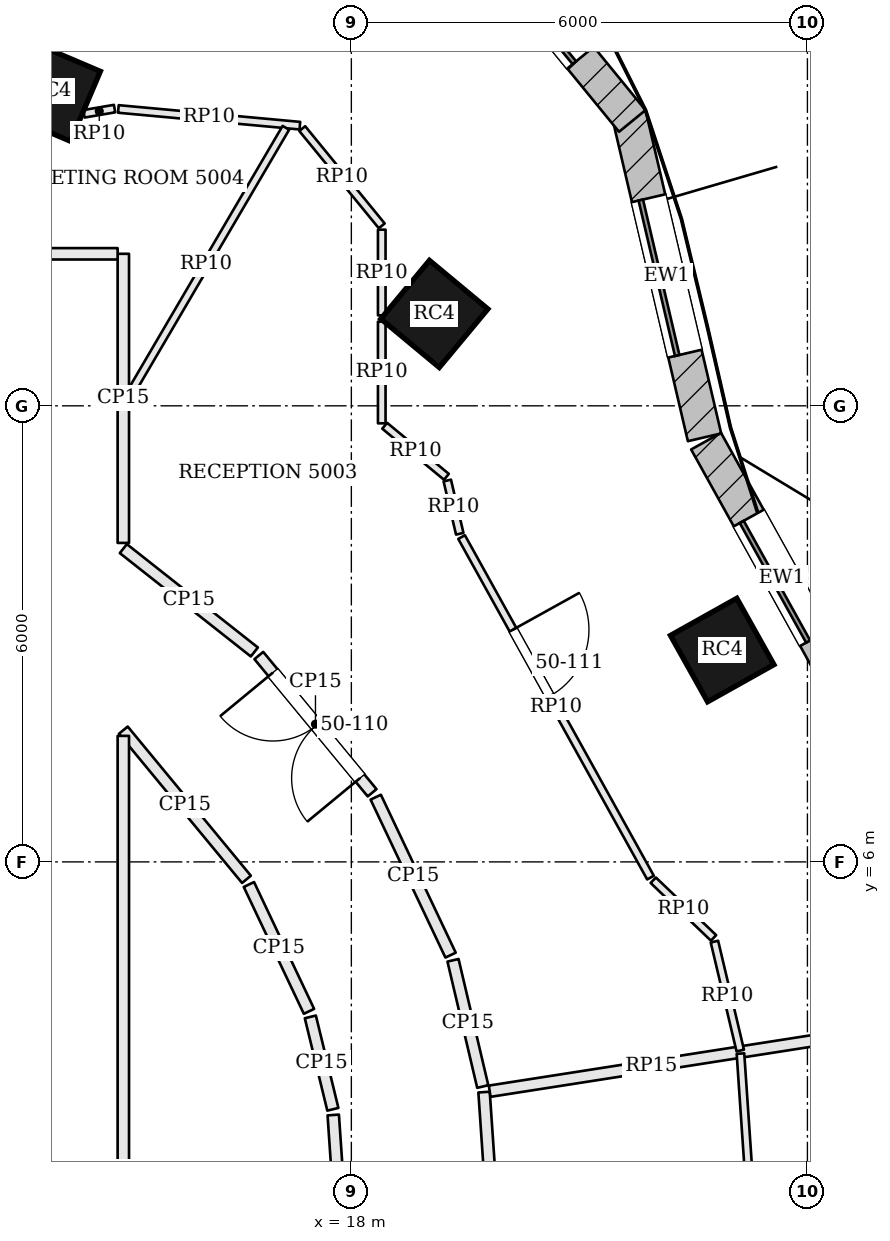
"""IFC4 building model, lengths in metres.
Left out: names, types, materials, properties, quantities, classifications, styles, units other than length and angle.
Written with IfcOpenShell. Run it as: python <this file> out.ifc"""

import sys

from ifc_helpers import new_model, si_unit, direction, frame, frame_2d, origin, origin_2d, place, context, subcontext, project, spatial, rectangle, extrude, element, fill, save


model = new_model("IFC4")
c1 = context("Model", 3, precision=1e-05, world=origin(), true_north=direction((0.0, 1.0)))
c2 = subcontext(c1, "Body", "Model", "MODEL_VIEW")
j1 = project(units=[si_unit("LENGTHUNIT", "METRE"), si_unit("PLANEANGLEUNIT", "RADIAN")], contexts=[c1])
p1 = place(None, origin())
s1 = spatial("IfcSite", under=j1, at=p1, CompositionType="ELEMENT")
p2 = place(p1, origin())
s2 = spatial("IfcBuilding", under=s1, at=p2, CompositionType="ELEMENT")
p3 = place(p2, frame((0.0, 0.0, 205.2)))
s3 = spatial("IfcBuildingStorey", under=s2, at=p3, CompositionType="ELEMENT", Elevation=205.2)
for number, where, z_axis, x_axis in (
    (1, (22.879, 8.787, 0.0), (0.0, 0.0, 1.0), (-0.489, 0.873, 0.0)),
    (2, (19.092, 13.209, 0.0), (0.0, 0.0, 1.0), (-0.769, 0.639, 0.0)),
    (3, (14.042, 16.136, 0.0), (0.0, 0.0, 1.0), (-0.92, 0.392, 0.0)),
):
    element("IfcColumn", number, at=place(p3, frame(where, z_axis=z_axis, x_axis=x_axis)), inside=s3, PredefinedType="COLUMN", context=c2, shape_type="SweptSolid", body=[
        extrude(rectangle(XDim=1.0, YDim=1.0, at=origin_2d()), origin(), (0.0, 0.0, 1.0), 3.9),
    ])
p4 = place(p3, frame((24.662, 7.939, 0.0), z_axis=(0.0, 0.0, 1.0), x_axis=(-0.485153910721, 0.874428775208, 0.0)))
e4 = element("IfcWall", 4, at=p4, inside=s3, PredefinedType="SOLIDWALL", context=c2, shape_type="SweptSolid", body=[
    extrude(rectangle(XDim=4.112, YDim=0.45, at=frame_2d((2.056, 0.0))), origin(), (0.0, 0.0, 1.0), 3.7),
])
p5 = place(p4, frame((1.156, 0.0, 0.9)))
e5 = element("IfcOpeningElement", 5, at=p5, cuts=e4, PredefinedType="OPENING", context=c2, shape_type="SweptSolid", body=[
    extrude(rectangle(XDim=1.8, YDim=2.3, at=frame_2d((0.9, 1.15))), frame((0.0, 0.235, 0.0), z_axis=(0.0, -1.0, 0.0), x_axis=(1.0, 0.0, 0.0)), (0.0, 0.0, 1.0), 0.47),
])
p6 = place(p3, frame((22.646, 11.586, 0.0), z_axis=(0.0, 0.0, 1.0), x_axis=(-0.227925124198, 0.973678662475, 0.0)))
e6 = element("IfcWall", 6, at=p6, inside=s3, PredefinedType="SOLIDWALL", context=c2, shape_type="SweptSolid", body=[
    extrude(rectangle(XDim=4.361, YDim=0.45, at=frame_2d((2.18, 0.0))), origin(), (0.0, 0.0, 1.0), 3.7),
])
p7 = place(p6, frame((1.13, 0.0, 0.9)))
e7 = element("IfcOpeningElement", 7, at=p7, cuts=e6, PredefinedType="OPENING", context=c2, shape_type="SweptSolid", body=[
    extrude(rectangle(XDim=2.1, YDim=2.3, at=frame_2d((1.05, 1.15))), frame((0.0, 0.235, 0.0), z_axis=(0.0, -1.0, 0.0), x_axis=(1.0, 0.0, 0.0)), (0.0, 0.0, 1.0), 0.47),
])
p8 = place(p3, frame((21.696, 15.748, 0.0), z_axis=(0.0, 0.0, 1.0), x_axis=(-0.632968710519, 0.774177377288, 0.0)))
e8 = element("IfcWall", 8, at=p8, inside=s3, PredefinedType="SOLIDWALL", context=c2, shape_type="SweptSolid", body=[
    extrude(rectangle(XDim=4.25, YDim=0.45, at=frame_2d((2.125, 0.0))), origin(), (0.0, 0.0, 1.0), 3.7),
])
p9 = place(p8, frame((1.075, 0.0, 0.9)))
e9 = element("IfcOpeningElement", 9, at=p9, cuts=e8, PredefinedType="OPENING", context=c2, shape_type="SweptSolid", body=[
    extrude(rectangle(XDim=2.1, YDim=2.3, at=frame_2d((1.05, 1.15))), frame((0.0, 0.235, 0.0), z_axis=(0.0, -1.0, 0.0), x_axis=(1.0, 0.0, 0.0)), (0.0, 0.0, 1.0), 0.47),
])
p10 = place(p3, frame((19.944, 0.075, 0.0), z_axis=(0.0, 0.0, 1.0), x_axis=(-0.068109486785, 0.997677852721, 0.0)))
e10 = element("IfcWall", 10, at=p10, inside=s3, PredefinedType="PARTITIONING", context=c2, shape_type="SweptSolid", body=[
    extrude(rectangle(XDim=2.904, YDim=0.15, at=frame_2d((1.452, 0.0))), origin(), (0.0, 0.0, 1.0), 3.084),
])
p11 = place(p3, frame((24.077, 3.648, 0.0), z_axis=(0.0, 0.0, 1.0), x_axis=(-0.988022565711, -0.15430946065, 0.0)))
e11 = element("IfcWall", 11, at=p11, inside=s3, PredefinedType="PARTITIONING", context=c2, shape_type="SweptSolid", body=[
    extrude(rectangle(XDim=4.308, YDim=0.15, at=frame_2d((2.154, 0.0))), origin(), (0.0, 0.0, 1.0), 3.184),
])
p12 = place(p3, frame((19.729, 3.044, 0.0), z_axis=(0.0, 0.0, 1.0), x_axis=(-0.229318400324, 0.973351463385, 0.0)))
e12 = element("IfcWall", 12, at=p12, inside=s3, PredefinedType="PARTITIONING", context=c2, shape_type="SweptSolid", body=[
    extrude(rectangle(XDim=1.707, YDim=0.15, at=frame_2d((0.853, 0.0))), origin(), (0.0, 0.0, 1.0), 3.084),
])
p13 = place(p3, frame((19.305, 4.773, 0.0), z_axis=(0.0, 0.0, 1.0), x_axis=(-0.428173054138, 0.903696760927, 0.0)))
e13 = element("IfcWall", 13, at=p13, inside=s3, PredefinedType="PARTITIONING", context=c2, shape_type="SweptSolid", body=[
    extrude(rectangle(XDim=2.3, YDim=0.15, at=frame_2d((1.15, 0.0))), origin(), (0.0, 0.0, 1.0), 3.084),
])
p14 = place(p3, frame((18.273, 6.909, 0.0), z_axis=(0.0, 0.0, 1.0), x_axis=(-0.63653648943, 0.771246586783, 0.0)))
e14 = element("IfcWall", 14, at=p14, inside=s3, PredefinedType="PARTITIONING", context=c2, shape_type="SweptSolid", body=[
    extrude(rectangle(XDim=2.342, YDim=0.15, at=frame_2d((1.171, 0.0))), origin(), (0.0, 0.0, 1.0), 3.084),
])
p15 = place(p14, frame((0.25, 0.0, 0.0)))
e15 = element("IfcOpeningElement", 15, at=p15, cuts=e14, PredefinedType="OPENING", context=c2, shape_type="SweptSolid", body=[
    extrude(rectangle(XDim=1.8, YDim=2.1, at=frame_2d((0.9, 1.05))), frame((0.0, 0.085, 0.0), z_axis=(0.0, -1.0, 0.0), x_axis=(1.0, 0.0, 0.0)), (0.0, 0.0, 1.0), 0.17),
])
p16 = place(p3, frame((16.724, 8.761, 0.0), z_axis=(0.0, 0.0, 1.0), x_axis=(-0.785124633057, 0.619337800047, 0.0)))
e16 = element("IfcWall", 16, at=p16, inside=s3, PredefinedType="PARTITIONING", context=c2, shape_type="SweptSolid", body=[
    extrude(rectangle(XDim=2.196, YDim=0.15, at=frame_2d((1.098, 0.0))), origin(), (0.0, 0.0, 1.0), 3.084),
])
p17 = place(p3, frame((15.0, 10.196, 0.0), z_axis=(0.0, 0.0, 1.0), x_axis=(0.0, 1.0, 0.0)))
e17 = element("IfcWall", 17, at=p17, inside=s3, PredefinedType="PARTITIONING", context=c2, shape_type="SweptSolid", body=[
    extrude(rectangle(XDim=3.804, YDim=0.15, at=frame_2d((1.902, 0.0))), origin(), (0.0, 0.0, 1.0), 3.084),
])
p18 = place(p3, frame((14.925, 14.0, 0.0), z_axis=(0.0, 0.0, 1.0), x_axis=(-1.0, 0.0, 0.0)))
e18 = element("IfcWall", 18, at=p18, inside=s3, PredefinedType="PARTITIONING", context=c2, shape_type="SweptSolid", body=[
    extrude(rectangle(XDim=29.925, YDim=0.15, at=frame_2d((14.962, 0.0))), origin(), (0.0, 0.0, 1.0), 3.084),
])
p19 = place(p18, frame((1.699, 0.0, 0.0)))
e19 = element("IfcOpeningElement", 19, at=p19, cuts=e18, PredefinedType="OPENING", context=c2, shape_type="SweptSolid", body=[
    extrude(rectangle(XDim=1.0, YDim=2.4, at=frame_2d((0.5, 1.2))), frame((0.0, 0.085, 0.0), z_axis=(0.0, -1.0, 0.0), x_axis=(1.0, 0.0, 0.0)), (0.0, 0.0, 1.0), 0.17),
])
p20 = place(p18, frame((10.223, 0.0, 0.0)))
e20 = element("IfcOpeningElement", 20, at=p20, cuts=e18, PredefinedType="OPENING", context=c2, shape_type="SweptSolid", body=[
    extrude(rectangle(XDim=1.0, YDim=2.4, at=frame_2d((0.5, 1.2))), frame((0.0, 0.085, 0.0), z_axis=(0.0, -1.0, 0.0), x_axis=(1.0, 0.0, 0.0)), (0.0, 0.0, 1.0), 0.17),
])
p21 = place(p18, frame((18.49, 0.0, 0.0)))
e21 = element("IfcOpeningElement", 21, at=p21, cuts=e18, PredefinedType="OPENING", context=c2, shape_type="SweptSolid", body=[
    extrude(rectangle(XDim=1.0, YDim=2.4, at=frame_2d((0.5, 1.2))), frame((0.0, 0.085, 0.0), z_axis=(0.0, -1.0, 0.0), x_axis=(1.0, 0.0, 0.0)), (0.0, 0.0, 1.0), 0.17),
])
p22 = place(p3, frame((15.0, 7.733, 0.0), z_axis=(0.0, 0.0, 1.0), x_axis=(0.636601263488, -0.771193121938, 0.0)))
e22 = element("IfcWall", 22, at=p22, inside=s3, PredefinedType="PARTITIONING", context=c2, shape_type="SweptSolid", body=[
    extrude(rectangle(XDim=2.545, YDim=0.15, at=frame_2d((1.272, 0.0))), origin(), (0.0, 0.0, 1.0), 3.084),
])
p23 = place(p3, frame((16.652, 5.702, 0.0), z_axis=(0.0, 0.0, 1.0), x_axis=(0.428126129773, -0.903718992279, 0.0)))
e23 = element("IfcWall", 23, at=p23, inside=s3, PredefinedType="PARTITIONING", context=c2, shape_type="SweptSolid", body=[
    extrude(rectangle(XDim=1.846, YDim=0.15, at=frame_2d((0.923, 0.0))), origin(), (0.0, 0.0, 1.0), 3.084),
])
p24 = place(p3, frame((17.46, 3.961, 0.0), z_axis=(0.0, 0.0, 1.0), x_axis=(0.236655249498, -0.971593687137, 0.0)))
e24 = element("IfcWall", 24, at=p24, inside=s3, PredefinedType="PARTITIONING", context=c2, shape_type="SweptSolid", body=[
    extrude(rectangle(XDim=1.251, YDim=0.15, at=frame_2d((0.626, 0.0))), origin(), (0.0, 0.0, 1.0), 3.084),
])
p25 = place(p3, frame((17.762, 2.67, 0.0), z_axis=(0.0, 0.0, 1.0), x_axis=(0.068135311644, -0.997676089373, 0.0)))
e25 = element("IfcWall", 25, at=p25, inside=s3, PredefinedType="PARTITIONING", context=c2, shape_type="SweptSolid", body=[
    extrude(rectangle(XDim=2.677, YDim=0.15, at=frame_2d((1.338, 0.0))), origin(), (0.0, 0.0, 1.0), 3.084),
])
p26 = place(p3, frame((15.0, -4.925, 0.0), z_axis=(0.0, 0.0, 1.0), x_axis=(0.0, 1.0, 0.0)))
e26 = element("IfcWall", 26, at=p26, inside=s3, PredefinedType="PARTITIONING", context=c2, shape_type="SweptSolid", body=[
    extrude(rectangle(XDim=12.583, YDim=0.15, at=frame_2d((6.292, 0.0))), origin(), (0.0, 0.0, 1.0), 3.084),
])
p27 = place(p26, frame((5.791, 0.0, 0.0)))
e27 = element("IfcOpeningElement", 27, at=p27, cuts=e26, PredefinedType="OPENING", context=c2, shape_type="SweptSolid", body=[
    extrude(rectangle(XDim=1.0, YDim=2.1, at=frame_2d((0.5, 1.05))), frame((0.0, 0.085, 0.0), z_axis=(0.0, -1.0, 0.0), x_axis=(1.0, 0.0, 0.0)), (0.0, 0.0, 1.0), 0.17),
])
p28 = place(p3, frame((23.119, 3.478, 0.0), z_axis=(0.0, 0.0, 1.0), x_axis=(0.068141123735, -0.997675692425, 0.0)))
e28 = element("IfcWall", 28, at=p28, inside=s3, PredefinedType="PARTITIONING", context=c2, shape_type="SweptSolid", body=[
    extrude(rectangle(XDim=3.486, YDim=0.1, at=frame_2d((1.743, 0.0))), origin(), (0.0, 0.0, 1.0), 3.084),
])
p29 = place(p3, frame((14.482, 15.842, 0.0), z_axis=(0.0, 0.0, 1.0), x_axis=(0.985806446381, 0.167885825111, 0.0)))
e29 = element("IfcWall", 29, at=p29, inside=s3, PredefinedType="PARTITIONING", context=c2, shape_type="SweptSolid", body=[
    extrude(rectangle(XDim=0.409, YDim=0.1, at=frame_2d((0.204, 0.0))), origin(), (0.0, 0.0, 1.0), 3.084),
])
p30 = place(p3, frame((14.935, 15.906, 0.0), z_axis=(0.0, 0.0, 1.0), x_axis=(0.995783150827, -0.09173830459, 0.0)))
e30 = element("IfcWall", 30, at=p30, inside=s3, PredefinedType="PARTITIONING", context=c2, shape_type="SweptSolid", body=[
    extrude(rectangle(XDim=2.398, YDim=0.1, at=frame_2d((1.199, 0.0))), origin(), (0.0, 0.0, 1.0), 3.084),
])
p31 = place(p3, frame((17.354, 15.647, 0.0), z_axis=(0.0, 0.0, 1.0), x_axis=(0.632948103301, -0.774194225326, 0.0)))
e31 = element("IfcWall", 31, at=p31, inside=s3, PredefinedType="PARTITIONING", context=c2, shape_type="SweptSolid", body=[
    extrude(rectangle(XDim=1.652, YDim=0.1, at=frame_2d((0.826, 0.0))), origin(), (0.0, 0.0, 1.0), 3.084),
])
p32 = place(p3, frame((18.4, 14.318, 0.0), z_axis=(0.0, 0.0, 1.0), x_axis=(0.0, -1.0, 0.0)))
e32 = element("IfcWall", 32, at=p32, inside=s3, PredefinedType="PARTITIONING", context=c2, shape_type="SweptSolid", body=[
    extrude(rectangle(XDim=1.127, YDim=0.1, at=frame_2d((0.564, 0.0))), origin(), (0.0, 0.0, 1.0), 3.084),
])
p33 = place(p3, frame((18.4, 13.108, 0.0), z_axis=(0.0, 0.0, 1.0), x_axis=(0.0, -1.0, 0.0)))
e33 = element("IfcWall", 33, at=p33, inside=s3, PredefinedType="PARTITIONING", context=c2, shape_type="SweptSolid", body=[
    extrude(rectangle(XDim=1.338, YDim=0.1, at=frame_2d((0.669, 0.0))), origin(), (0.0, 0.0, 1.0), 3.084),
])
p34 = place(p3, frame((18.438, 11.738, 0.0), z_axis=(0.0, 0.0, 1.0), x_axis=(0.77057087269, -0.637354320737, 0.0)))
e34 = element("IfcWall", 34, at=p34, inside=s3, PredefinedType="PARTITIONING", context=c2, shape_type="SweptSolid", body=[
    extrude(rectangle(XDim=1.054, YDim=0.1, at=frame_2d((0.527, 0.0))), origin(), (0.0, 0.0, 1.0), 3.084),
])
p35 = place(p3, frame((19.262, 11.017, 0.0), z_axis=(0.0, 0.0, 1.0), x_axis=(0.228055604604, -0.973648109539, 0.0)))
e35 = element("IfcWall", 35, at=p35, inside=s3, PredefinedType="PARTITIONING", context=c2, shape_type="SweptSolid", body=[
    extrude(rectangle(XDim=0.719, YDim=0.1, at=frame_2d((0.36, 0.0))), origin(), (0.0, 0.0, 1.0), 3.084),
])
p36 = place(p3, frame((19.45, 10.273, 0.0), z_axis=(0.0, 0.0, 1.0), x_axis=(0.485137067925, -0.87443811978, 0.0)))
e36 = element("IfcWall", 36, at=p36, inside=s3, PredefinedType="PARTITIONING", context=c2, shape_type="SweptSolid", body=[
    extrude(rectangle(XDim=5.123, YDim=0.1, at=frame_2d((2.562, 0.0))), origin(), (0.0, 0.0, 1.0), 3.084),
])
p37 = place(p36, frame((1.393, 0.0, 0.0)))
e37 = element("IfcOpeningElement", 37, at=p37, cuts=e36, PredefinedType="OPENING", context=c2, shape_type="SweptSolid", body=[
    extrude(rectangle(XDim=1.0, YDim=2.1, at=frame_2d((0.5, 1.05))), frame((0.0, 0.06, 0.0), z_axis=(0.0, -1.0, 0.0), x_axis=(1.0, 0.0, 0.0)), (0.0, 0.0, 1.0), 0.12),
])
p38 = place(p3, frame((21.972, 5.759, 0.0), z_axis=(0.0, 0.0, 1.0), x_axis=(0.722719124143, -0.691141857796, 0.0)))
e38 = element("IfcWall", 38, at=p38, inside=s3, PredefinedType="PARTITIONING", context=c2, shape_type="SweptSolid", body=[
    extrude(rectangle(XDim=1.098, YDim=0.1, at=frame_2d((0.549, 0.0))), origin(), (0.0, 0.0, 1.0), 3.084),
])
p39 = place(p3, frame((22.777, 4.951, 0.0), z_axis=(0.0, 0.0, 1.0), x_axis=(0.230701773802, -0.973024507176, 0.0)))
e39 = element("IfcWall", 39, at=p39, inside=s3, PredefinedType="PARTITIONING", context=c2, shape_type="SweptSolid", body=[
    extrude(rectangle(XDim=1.473, YDim=0.1, at=frame_2d((0.737, 0.0))), origin(), (0.0, 0.0, 1.0), 3.084),
])
p40 = place(p3, frame((15.038, 12.074, 0.0), z_axis=(0.0, 0.0, 1.0), x_axis=(0.5056938513, 0.862713004862, 0.0)))
e40 = element("IfcWall", 40, at=p40, inside=s3, PredefinedType="PARTITIONING", context=c2, shape_type="SweptSolid", body=[
    extrude(rectangle(XDim=4.153, YDim=0.1, at=frame_2d((2.076, 0.0))), origin(), (0.0, 0.0, 1.0), 3.084),
])
p41 = place(p5, origin())
e41 = element("IfcWindow", 41, at=p41, inside=s3, PartitioningType="SINGLE_PANEL", PredefinedType="WINDOW", context=c2, shape_type="SweptSolid", body=[
    extrude(rectangle(XDim=1.8, YDim=2.3, at=frame_2d((0.9, 1.15))), frame((0.0, 0.135, 0.0), z_axis=(0.0, -1.0, 0.0), x_axis=(1.0, 0.0, 0.0)), (0.0, 0.0, 1.0), 0.06),
])
fill(e5, e41)
p42 = place(p7, origin())
e42 = element("IfcWindow", 42, at=p42, inside=s3, PartitioningType="SINGLE_PANEL", PredefinedType="WINDOW", context=c2, shape_type="SweptSolid", body=[
    extrude(rectangle(XDim=2.1, YDim=2.3, at=frame_2d((1.05, 1.15))), frame((0.0, 0.135, 0.0), z_axis=(0.0, -1.0, 0.0), x_axis=(1.0, 0.0, 0.0)), (0.0, 0.0, 1.0), 0.06),
])
fill(e7, e42)
p43 = place(p9, origin())
e43 = element("IfcWindow", 43, at=p43, inside=s3, PartitioningType="SINGLE_PANEL", PredefinedType="WINDOW", context=c2, shape_type="SweptSolid", body=[
    extrude(rectangle(XDim=2.1, YDim=2.3, at=frame_2d((1.05, 1.15))), frame((0.0, 0.135, 0.0), z_axis=(0.0, -1.0, 0.0), x_axis=(1.0, 0.0, 0.0)), (0.0, 0.0, 1.0), 0.06),
])
fill(e9, e43)
p44 = place(p15, origin())
e44 = element("IfcDoor", 44, at=p44, inside=s3, OperationType="DOUBLE_DOOR_SINGLE_SWING", PredefinedType="DOOR", context=c2, shape_type="SweptSolid", body=[
    extrude(rectangle(XDim=1.8, YDim=2.1, at=frame_2d((0.9, 1.05))), frame((0.0, 0.025, 0.0), z_axis=(0.0, -1.0, 0.0), x_axis=(1.0, 0.0, 0.0)), (0.0, 0.0, 1.0), 0.05),
])
fill(e15, e44)
p45 = place(p37, origin())
e45 = element("IfcDoor", 45, at=p45, inside=s3, OperationType="SINGLE_SWING_LEFT", PredefinedType="DOOR", context=c2, shape_type="SweptSolid", body=[
    extrude(rectangle(XDim=1.0, YDim=2.1, at=frame_2d((0.5, 1.05))), frame((0.0, 0.025, 0.0), z_axis=(0.0, -1.0, 0.0), x_axis=(1.0, 0.0, 0.0)), (0.0, 0.0, 1.0), 0.05),
])
fill(e37, e45)
save(model, sys.argv[1])
